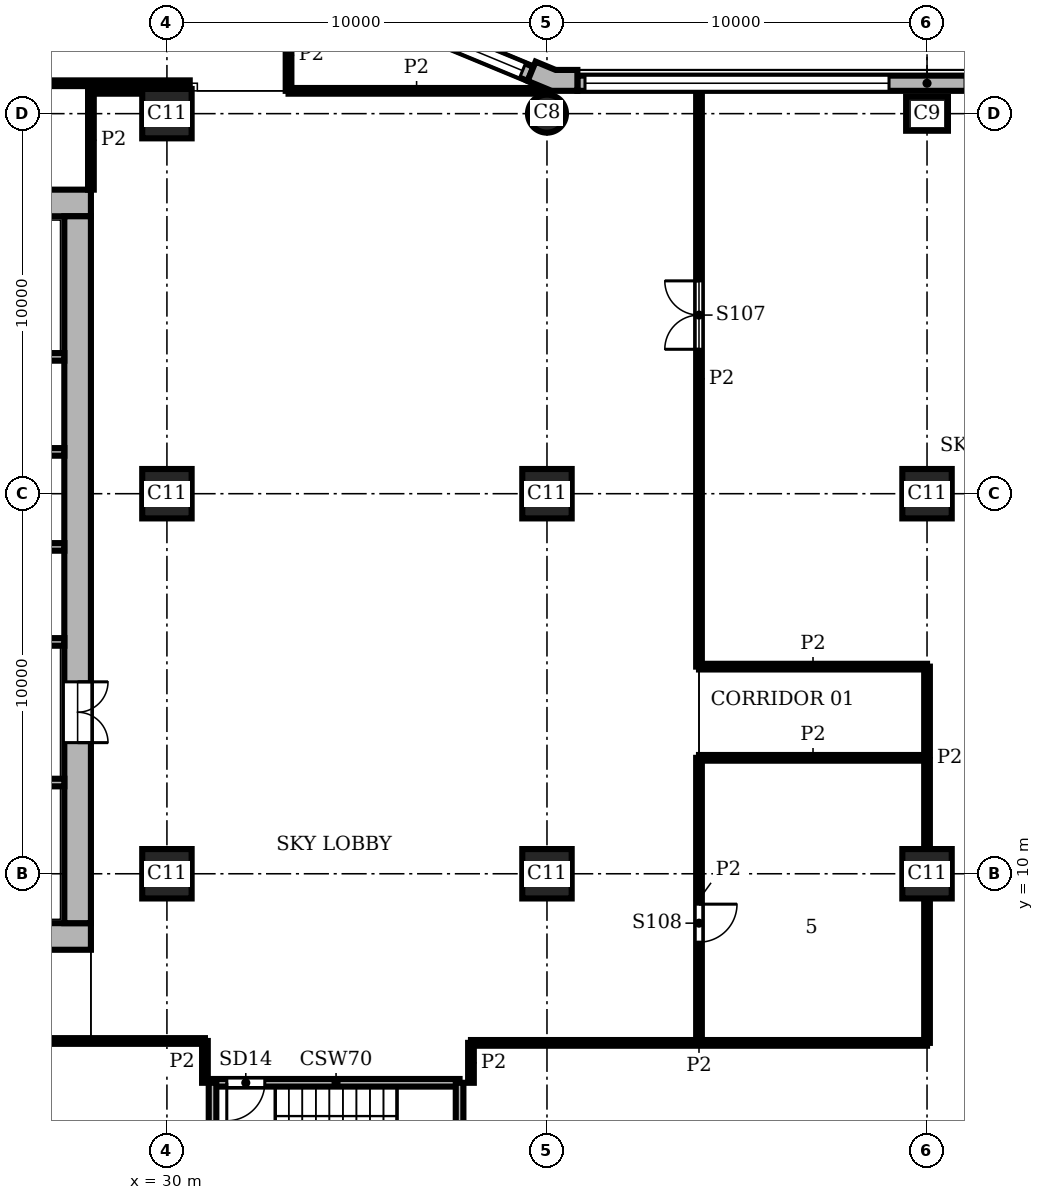
"""IFC4 building model, lengths in metres.
Left out: names, types, materials, properties, quantities, classifications, styles, units other than length and angle.
Written with IfcOpenShell. Run it as: python <this file> out.ifc"""

import sys

from ifc_helpers import new_model, si_unit, direction, frame, frame_2d, origin, origin_2d, place, context, subcontext, project, spatial, polyline, rectangle, circle, outline, extrude, element, fill, save


model = new_model("IFC4")
c1 = context("Model", 3, precision=1e-05, world=origin(), true_north=direction((0.0, 1.0)))
c2 = subcontext(c1, "Body", "Model", "MODEL_VIEW")
j1 = project(units=[si_unit("LENGTHUNIT", "METRE"), si_unit("PLANEANGLEUNIT", "RADIAN")], contexts=[c1])
p1 = place(None, origin())
s1 = spatial("IfcSite", under=j1, at=p1, CompositionType="ELEMENT")
p2 = place(p1, origin())
s2 = spatial("IfcBuilding", under=s1, at=p2, CompositionType="ELEMENT")
p3 = place(p2, frame((0.0, 0.0, 126.3)))
s3 = spatial("IfcBuildingStorey", under=s2, at=p3, CompositionType="ELEMENT", Elevation=126.3)
p4 = place(p3, frame((50.0, 30.0, 0.0), z_axis=(0.0, 0.0, 1.0), x_axis=(1.0, 0.0, 0.0)))
e1 = element("IfcColumn", 1, at=p4, inside=s3, PredefinedType="COLUMN", context=c2, shape_type="SweptSolid", body=[
    extrude(rectangle(XDim=1.1, YDim=0.9, at=origin_2d()), origin(), (0.0, 0.0, 1.0), 5.4),
])
p5 = place(p3, frame((40.0, 30.0, 0.0), z_axis=(0.0, 0.0, 1.0), x_axis=(1.0, 0.0, 0.0)))
e2 = element("IfcColumn", 2, at=p5, inside=s3, PredefinedType="COLUMN", context=c2, shape_type="SweptSolid", body=[
    extrude(circle(Radius=0.5, at=origin_2d()), origin(), (0.0, 0.0, 1.0), 5.4),
])
for number, where, z_axis, x_axis in (
    (3, (30.0, 10.0, 0.0), (0.0, 0.0, 1.0), (1.0, 0.0, 0.0)),
    (4, (30.0, 20.0, 0.0), (0.0, 0.0, 1.0), (1.0, 0.0, 0.0)),
    (5, (30.0, 30.0, 0.0), (0.0, 0.0, 1.0), (1.0, 0.0, 0.0)),
    (6, (40.0, 10.0, 0.0), (0.0, 0.0, 1.0), (1.0, 0.0, 0.0)),
    (7, (40.0, 20.0, 0.0), (0.0, 0.0, 1.0), (1.0, 0.0, 0.0)),
    (8, (50.0, 10.0, 0.0), (0.0, 0.0, 1.0), (1.0, 0.0, 0.0)),
    (9, (50.0, 20.0, 0.0), (0.0, 0.0, 1.0), (1.0, 0.0, 0.0)),
):
    element("IfcColumn", number, at=place(p3, frame(where, z_axis=z_axis, x_axis=x_axis)), inside=s3, PredefinedType="COLUMN", context=c2, shape_type="SweptSolid", body=[
        extrude(rectangle(XDim=1.3, YDim=1.3, at=origin_2d()), origin(), (0.0, 0.0, 1.0), 5.4),
    ])
p6 = place(p3, frame((8.0, 8.35, 0.0), z_axis=(0.0, 0.0, 1.0), x_axis=(1.0, 0.0, 0.0)))
e10 = element("IfcWall", 10, at=p6, inside=s3, PredefinedType="SHEAR", context=c2, shape_type="SweptSolid", body=[
    extrude(rectangle(XDim=20.0, YDim=0.7, at=frame_2d((10.0, 0.0))), origin(), (0.0, 0.0, 1.0), 5.4),
])
p7 = place(p3, frame((27.65, 8.7, 0.0), z_axis=(0.0, 0.0, 1.0), x_axis=(0.0, 1.0, 0.0)))
e11 = element("IfcWall", 11, at=p7, inside=s3, PredefinedType="SHEAR", context=c2, shape_type="SweptSolid", body=[
    extrude(rectangle(XDim=18.6, YDim=0.7, at=frame_2d((9.3, 0.0))), origin(), (0.0, 0.0, 1.0), 5.4),
])
p8 = place(p7, frame((4.75, 0.0, 0.0)))
e12 = element("IfcOpeningElement", 12, at=p8, cuts=e11, PredefinedType="OPENING", context=c2, shape_type="SweptSolid", body=[
    extrude(rectangle(XDim=1.6, YDim=2.1, at=frame_2d((0.8, 1.05))), frame((0.0, 0.36, 0.0), z_axis=(0.0, -1.0, 0.0), x_axis=(1.0, 0.0, 0.0)), (0.0, 0.0, 1.0), 0.72),
])
p9 = place(p3, frame((28.0, 27.65, 0.0), z_axis=(0.0, 0.0, 1.0), x_axis=(-1.0, 0.0, 0.0)))
e13 = element("IfcWall", 13, at=p9, inside=s3, PredefinedType="SHEAR", context=c2, shape_type="SweptSolid", body=[
    extrude(rectangle(XDim=20.0, YDim=0.7, at=frame_2d((10.0, 0.0))), origin(), (0.0, 0.0, 1.0), 5.4),
])
p10 = place(p3, origin())
e14 = element("IfcWall", 14, at=p10, inside=s3, PredefinedType="SOLIDWALL", context=c2, shape_type="SweptSolid", body=[
    extrude(outline(polyline([(40.8, 31.0), (40.8, 31.15), (40.229, 31.15), (39.701, 31.369), (39.644, 31.23), (39.49, 30.861), (40.119, 30.6), (40.8, 30.6), (40.8, 31.0)])), origin(), (0.0, 0.0, 1.0), 5.4),
])
p11 = place(p3, frame((59.2, 30.8, 0.0), z_axis=(0.0, 0.0, 1.0), x_axis=(-1.0, 0.0, 0.0)))
e15 = element("IfcWall", 15, at=p11, inside=s3, PredefinedType="SOLIDWALL", context=c2, shape_type="SweptSolid", body=[
    extrude(rectangle(XDim=18.4, YDim=0.4, at=frame_2d((9.2, 0.0))), origin(), (0.0, 0.0, 1.0), 5.4),
])
p12 = place(p11, frame((0.2, 0.0, 0.9)))
e16 = element("IfcOpeningElement", 16, at=p12, cuts=e15, PredefinedType="OPENING", context=c2, shape_type="SweptSolid", body=[
    extrude(rectangle(XDim=8.0, YDim=3.4, at=frame_2d((4.0, 1.7))), frame((0.0, 0.21, 0.0), z_axis=(0.0, -1.0, 0.0), x_axis=(1.0, 0.0, 0.0)), (0.0, 0.0, 1.0), 0.42),
])
p13 = place(p11, frame((10.2, 0.0, 0.9)))
e17 = element("IfcOpeningElement", 17, at=p13, cuts=e15, PredefinedType="OPENING", context=c2, shape_type="SweptSolid", body=[
    extrude(rectangle(XDim=8.0, YDim=3.4, at=frame_2d((4.0, 1.7))), frame((0.0, 0.21, 0.0), z_axis=(0.0, -1.0, 0.0), x_axis=(1.0, 0.0, 0.0)), (0.0, 0.0, 1.0), 0.42),
])
p14 = place(p3, frame((39.567, 31.045, 0.0), z_axis=(0.0, 0.0, 1.0), x_axis=(-0.923891000409, 0.382655745237, 0.0)))
e18 = element("IfcWall", 18, at=p14, inside=s3, PredefinedType="SOLIDWALL", context=c2, shape_type="SweptSolid", body=[
    extrude(rectangle(XDim=6.053, YDim=0.4, at=frame_2d((3.027, 0.0))), origin(), (0.0, 0.0, 1.0), 5.4),
])
p15 = place(p14, frame((0.227, 0.0, 0.9)))
e19 = element("IfcOpeningElement", 19, at=p15, cuts=e18, PredefinedType="OPENING", context=c2, shape_type="SweptSolid", body=[
    extrude(rectangle(XDim=5.6, YDim=3.4, at=frame_2d((2.8, 1.7))), frame((0.0, 0.21, 0.0), z_axis=(0.0, -1.0, 0.0), x_axis=(1.0, 0.0, 0.0)), (0.0, 0.0, 1.0), 0.42),
])
p16 = place(p3, frame((31.2, 4.5, 0.0), z_axis=(0.0, 0.0, 1.0), x_axis=(1.0, 0.0, 0.0)))
e20 = element("IfcWall", 20, at=p16, inside=s3, PredefinedType="SHEAR", context=c2, shape_type="SweptSolid", body=[
    extrude(rectangle(XDim=6.5, YDim=0.2, at=frame_2d((3.25, 0.0))), origin(), (0.0, 0.0, 1.0), 5.08),
])
p17 = place(p16, frame((0.375, 0.0, 0.0)))
e21 = element("IfcOpeningElement", 21, at=p17, cuts=e20, PredefinedType="OPENING", context=c2, shape_type="SweptSolid", body=[
    extrude(rectangle(XDim=1.0, YDim=2.1, at=frame_2d((0.5, 1.05))), frame((0.0, 0.11, 0.0), z_axis=(0.0, -1.0, 0.0), x_axis=(1.0, 0.0, 0.0)), (0.0, 0.0, 1.0), 0.22),
])
p18 = place(p3, frame((13.8, 12.4, 0.0), z_axis=(0.0, 0.0, 1.0), x_axis=(1.0, 0.0, 0.0)))
e22 = element("IfcWall", 22, at=p18, inside=s3, PredefinedType="SHEAR", context=c2, shape_type="SweptSolid", body=[
    extrude(rectangle(XDim=13.5, YDim=0.2, at=frame_2d((6.75, 0.0))), origin(), (0.0, 0.0, 1.0), 5.08),
])
p19 = place(p18, frame((2.4, 0.0, 0.0)))
e23 = element("IfcOpeningElement", 23, at=p19, cuts=e22, PredefinedType="OPENING", context=c2, shape_type="SweptSolid", body=[
    extrude(rectangle(XDim=1.1, YDim=2.1, at=frame_2d((0.55, 1.05))), frame((0.0, 0.11, 0.0), z_axis=(0.0, -1.0, 0.0), x_axis=(1.0, 0.0, 0.0)), (0.0, 0.0, 1.0), 0.22),
])
p20 = place(p18, frame((4.9, 0.0, 0.0)))
e24 = element("IfcOpeningElement", 24, at=p20, cuts=e22, PredefinedType="OPENING", context=c2, shape_type="SweptSolid", body=[
    extrude(rectangle(XDim=1.1, YDim=2.1, at=frame_2d((0.55, 1.05))), frame((0.0, 0.11, 0.0), z_axis=(0.0, -1.0, 0.0), x_axis=(1.0, 0.0, 0.0)), (0.0, 0.0, 1.0), 0.22),
])
p21 = place(p18, frame((0.2, 0.0, 0.0)))
e25 = element("IfcOpeningElement", 25, at=p21, cuts=e22, PredefinedType="OPENING", context=c2, shape_type="SweptSolid", body=[
    extrude(rectangle(XDim=1.0, YDim=2.1, at=frame_2d((0.5, 1.05))), frame((0.0, 0.11, 0.0), z_axis=(0.0, -1.0, 0.0), x_axis=(1.0, 0.0, 0.0)), (0.0, 0.0, 1.0), 0.22),
])
for number, where, z_axis, x_axis in (
    (26, (24.3, 16.1, 0.0), (0.0, 0.0, 1.0), (1.0, 0.0, 0.0)),
    (27, (24.3, 18.6, 0.0), (0.0, 0.0, 1.0), (1.0, 0.0, 0.0)),
    (28, (24.3, 21.1, 0.0), (0.0, 0.0, 1.0), (1.0, 0.0, 0.0)),
):
    element("IfcWall", number, at=place(p3, frame(where, z_axis=z_axis, x_axis=x_axis)), inside=s3, PredefinedType="SHEAR", context=c2, shape_type="SweptSolid", body=[
        extrude(rectangle(XDim=3.0, YDim=0.2, at=frame_2d((1.5, 0.0))), origin(), (0.0, 0.0, 1.0), 5.08),
    ])
p22 = place(p3, frame((13.8, 23.6, 0.0), z_axis=(0.0, 0.0, 1.0), x_axis=(1.0, 0.0, 0.0)))
e29 = element("IfcWall", 29, at=p22, inside=s3, PredefinedType="SHEAR", context=c2, shape_type="SweptSolid", body=[
    extrude(rectangle(XDim=13.5, YDim=0.2, at=frame_2d((6.75, 0.0))), origin(), (0.0, 0.0, 1.0), 5.08),
])
p23 = place(p22, frame((2.4, 0.0, 0.0)))
e30 = element("IfcOpeningElement", 30, at=p23, cuts=e29, PredefinedType="OPENING", context=c2, shape_type="SweptSolid", body=[
    extrude(rectangle(XDim=1.1, YDim=2.1, at=frame_2d((0.55, 1.05))), frame((0.0, 0.11, 0.0), z_axis=(0.0, -1.0, 0.0), x_axis=(1.0, 0.0, 0.0)), (0.0, 0.0, 1.0), 0.22),
])
p24 = place(p22, frame((4.9, 0.0, 0.0)))
e31 = element("IfcOpeningElement", 31, at=p24, cuts=e29, PredefinedType="OPENING", context=c2, shape_type="SweptSolid", body=[
    extrude(rectangle(XDim=1.1, YDim=2.1, at=frame_2d((0.55, 1.05))), frame((0.0, 0.11, 0.0), z_axis=(0.0, -1.0, 0.0), x_axis=(1.0, 0.0, 0.0)), (0.0, 0.0, 1.0), 0.22),
])
p25 = place(p22, frame((0.2, 0.0, 0.0)))
e32 = element("IfcOpeningElement", 32, at=p25, cuts=e29, PredefinedType="OPENING", context=c2, shape_type="SweptSolid", body=[
    extrude(rectangle(XDim=1.0, YDim=2.1, at=frame_2d((0.5, 1.05))), frame((0.0, 0.11, 0.0), z_axis=(0.0, -1.0, 0.0), x_axis=(1.0, 0.0, 0.0)), (0.0, 0.0, 1.0), 0.22),
])
for number, where, z_axis, x_axis in (
    (33, (31.2, 1.2, 0.0), (0.0, 0.0, 1.0), (0.0, 1.0, 0.0)),
    (34, (37.7, 1.2, 0.0), (0.0, 0.0, 1.0), (0.0, 1.0, 0.0)),
):
    element("IfcWall", number, at=place(p3, frame(where, z_axis=z_axis, x_axis=x_axis)), inside=s3, PredefinedType="SHEAR", context=c2, shape_type="SweptSolid", body=[
        extrude(rectangle(XDim=3.3, YDim=0.2, at=frame_2d((1.65, 0.0))), origin(), (0.0, 0.0, 1.0), 5.08),
    ])
p26 = place(p3, frame((28.0, 28.0, 0.0), z_axis=(0.0, 0.0, 1.0), x_axis=(0.0, 1.0, 0.0)))
e35 = element("IfcWall", 35, at=p26, inside=s3, PredefinedType="PARTITIONING", context=c2, shape_type="SweptSolid", body=[
    extrude(rectangle(XDim=2.598, YDim=0.15, at=frame_2d((1.299, 0.0))), origin(), (0.0, 0.0, 1.0), 5.08),
])
p27 = place(p3, frame((31.0, 4.5, 0.0), z_axis=(0.0, 0.0, 1.0), x_axis=(0.0, 1.0, 0.0)))
e36 = element("IfcWall", 36, at=p27, inside=s3, PredefinedType="PARTITIONING", context=c2, shape_type="SweptSolid", body=[
    extrude(rectangle(XDim=1.1, YDim=0.15, at=frame_2d((0.55, 0.0))), origin(), (0.0, 0.0, 1.0), 5.08),
])
p28 = place(p3, frame((33.2, 30.6, 0.0), z_axis=(0.0, 0.0, 1.0), x_axis=(0.0, 1.0, 0.0)))
e37 = element("IfcWall", 37, at=p28, inside=s3, PredefinedType="PARTITIONING", context=c2, shape_type="SweptSolid", body=[
    extrude(rectangle(XDim=1.869, YDim=0.15, at=frame_2d((0.935, 0.0))), origin(), (0.0, 0.0, 1.0), 5.08),
])
p29 = place(p3, frame((38.0, 4.5, 0.0), z_axis=(0.0, 0.0, 1.0), x_axis=(0.0, 1.0, 0.0)))
e38 = element("IfcWall", 38, at=p29, inside=s3, PredefinedType="PARTITIONING", context=c2, shape_type="SweptSolid", body=[
    extrude(rectangle(XDim=1.05, YDim=0.15, at=frame_2d((0.525, 0.0))), origin(), (0.0, 0.0, 1.0), 5.08),
])
p30 = place(p3, frame((44.0, 5.6, 0.0), z_axis=(0.0, 0.0, 1.0), x_axis=(0.0, 1.0, 0.0)))
e39 = element("IfcWall", 39, at=p30, inside=s3, PredefinedType="PARTITIONING", context=c2, shape_type="SweptSolid", body=[
    extrude(rectangle(XDim=7.45, YDim=0.15, at=frame_2d((3.725, 0.0))), origin(), (0.0, 0.0, 1.0), 5.08),
])
p31 = place(p30, frame((2.6, 0.0, 0.0)))
e40 = element("IfcOpeningElement", 40, at=p31, cuts=e39, PredefinedType="OPENING", context=c2, shape_type="SweptSolid", body=[
    extrude(rectangle(XDim=1.0, YDim=2.1, at=frame_2d((0.5, 1.05))), frame((0.0, 0.085, 0.0), z_axis=(0.0, -1.0, 0.0), x_axis=(1.0, 0.0, 0.0)), (0.0, 0.0, 1.0), 0.17),
])
p32 = place(p3, frame((44.0, 15.45, 0.0), z_axis=(0.0, 0.0, 1.0), x_axis=(0.0, 1.0, 0.0)))
e41 = element("IfcWall", 41, at=p32, inside=s3, PredefinedType="PARTITIONING", context=c2, shape_type="SweptSolid", body=[
    extrude(rectangle(XDim=15.15, YDim=0.15, at=frame_2d((7.575, 0.0))), origin(), (0.0, 0.0, 1.0), 5.08),
])
p33 = place(p32, frame((8.35, 0.0, 0.0)))
e42 = element("IfcOpeningElement", 42, at=p33, cuts=e41, PredefinedType="OPENING", context=c2, shape_type="SweptSolid", body=[
    extrude(rectangle(XDim=1.8, YDim=2.1, at=frame_2d((0.9, 1.05))), frame((0.0, 0.085, 0.0), z_axis=(0.0, -1.0, 0.0), x_axis=(1.0, 0.0, 0.0)), (0.0, 0.0, 1.0), 0.17),
])
p34 = place(p3, frame((50.0, 5.55, 0.0), z_axis=(0.0, 0.0, 1.0), x_axis=(0.0, 1.0, 0.0)))
e43 = element("IfcWall", 43, at=p34, inside=s3, PredefinedType="PARTITIONING", context=c2, shape_type="SweptSolid", body=[
    extrude(rectangle(XDim=3.8, YDim=0.15, at=frame_2d((1.9, 0.0))), origin(), (0.0, 0.0, 1.0), 5.08),
])
p35 = place(p3, frame((50.0, 10.65, 0.0), z_axis=(0.0, 0.0, 1.0), x_axis=(0.0, 1.0, 0.0)))
e44 = element("IfcWall", 44, at=p35, inside=s3, PredefinedType="PARTITIONING", context=c2, shape_type="SweptSolid", body=[
    extrude(rectangle(XDim=4.8, YDim=0.15, at=frame_2d((2.4, 0.0))), origin(), (0.0, 0.0, 1.0), 5.08),
])
p36 = place(p3, frame((38.0, 5.55, 0.0), z_axis=(0.0, 0.0, 1.0), x_axis=(1.0, 0.0, 0.0)))
e45 = element("IfcWall", 45, at=p36, inside=s3, PredefinedType="PARTITIONING", context=c2, shape_type="SweptSolid", body=[
    extrude(rectangle(XDim=12.0, YDim=0.15, at=frame_2d((6.0, 0.0))), origin(), (0.0, 0.0, 1.0), 5.08),
])
p37 = place(p3, frame((5.6, 5.6, 0.0), z_axis=(0.0, 0.0, 1.0), x_axis=(1.0, 0.0, 0.0)))
e46 = element("IfcWall", 46, at=p37, inside=s3, PredefinedType="PARTITIONING", context=c2, shape_type="SweptSolid", body=[
    extrude(rectangle(XDim=25.4, YDim=0.15, at=frame_2d((12.7, 0.0))), origin(), (0.0, 0.0, 1.0), 5.08),
])
p38 = place(p37, frame((4.1, 0.0, 0.0)))
e47 = element("IfcOpeningElement", 47, at=p38, cuts=e46, PredefinedType="OPENING", context=c2, shape_type="SweptSolid", body=[
    extrude(rectangle(XDim=0.8, YDim=2.1, at=frame_2d((0.4, 1.05))), frame((0.0, 0.085, 0.0), z_axis=(0.0, -1.0, 0.0), x_axis=(1.0, 0.0, 0.0)), (0.0, 0.0, 1.0), 0.17),
])
p39 = place(p37, frame((11.5, 0.0, 0.0)))
e48 = element("IfcOpeningElement", 48, at=p39, cuts=e46, PredefinedType="OPENING", context=c2, shape_type="SweptSolid", body=[
    extrude(rectangle(XDim=1.0, YDim=2.1, at=frame_2d((0.5, 1.05))), frame((0.0, 0.085, 0.0), z_axis=(0.0, -1.0, 0.0), x_axis=(1.0, 0.0, 0.0)), (0.0, 0.0, 1.0), 0.17),
])
for number, where, z_axis, x_axis in (
    (49, (44.0, 13.05, 0.0), (0.0, 0.0, 1.0), (1.0, 0.0, 0.0)),
    (50, (44.0, 15.45, 0.0), (0.0, 0.0, 1.0), (1.0, 0.0, 0.0)),
):
    element("IfcWall", number, at=place(p3, frame(where, z_axis=z_axis, x_axis=x_axis)), inside=s3, PredefinedType="PARTITIONING", context=c2, shape_type="SweptSolid", body=[
        extrude(rectangle(XDim=6.0, YDim=0.15, at=frame_2d((3.0, 0.0))), origin(), (0.0, 0.0, 1.0), 5.08),
    ])
p40 = place(p3, frame((28.002, 30.6, 0.0), z_axis=(0.0, 0.0, 1.0), x_axis=(1.0, 0.0, 0.0)))
e51 = element("IfcWall", 51, at=p40, inside=s3, PredefinedType="PARTITIONING", context=c2, shape_type="SweptSolid", body=[
    extrude(rectangle(XDim=1.348, YDim=0.15, at=frame_2d((0.674, 0.0))), origin(), (0.0, 0.0, 1.0), 5.08),
])
p41 = place(p3, frame((33.2, 30.6, 0.0), z_axis=(0.0, 0.0, 1.0), x_axis=(1.0, 0.0, 0.0)))
e52 = element("IfcWall", 52, at=p41, inside=s3, PredefinedType="PARTITIONING", context=c2, shape_type="SweptSolid", body=[
    extrude(rectangle(XDim=6.738, YDim=0.15, at=frame_2d((3.369, 0.0))), origin(), (0.0, 0.0, 1.0), 5.08),
])
p42 = place(p3, frame((13.802, 30.8, 0.0), z_axis=(0.0, 0.0, 1.0), x_axis=(1.0, 0.0, 0.0)))
e53 = element("IfcWall", 53, at=p42, inside=s3, PredefinedType="PARTITIONING", context=c2, shape_type="SweptSolid", body=[
    extrude(rectangle(XDim=16.798, YDim=0.15, at=frame_2d((8.399, 0.0))), origin(), (0.0, 0.0, 1.0), 5.08),
])
p43 = place(p42, frame((8.35, 0.0, 0.0)))
e54 = element("IfcOpeningElement", 54, at=p43, cuts=e53, PredefinedType="OPENING", context=c2, shape_type="SweptSolid", body=[
    extrude(rectangle(XDim=1.0, YDim=2.1, at=frame_2d((0.5, 1.05))), frame((0.0, 0.085, 0.0), z_axis=(0.0, -1.0, 0.0), x_axis=(1.0, 0.0, 0.0)), (0.0, 0.0, 1.0), 0.17),
])
p44 = place(p13, origin())
e55 = element("IfcWindow", 55, at=p44, inside=s3, PartitioningType="SINGLE_PANEL", PredefinedType="WINDOW", context=c2, shape_type="SweptSolid", body=[
    extrude(rectangle(XDim=8.0, YDim=3.4, at=frame_2d((4.0, 1.7))), frame((0.0, 0.16, 0.0), z_axis=(0.0, -1.0, 0.0), x_axis=(1.0, 0.0, 0.0)), (0.0, 0.0, 1.0), 0.06),
])
fill(e17, e55)
p45 = place(p15, origin())
e56 = element("IfcWindow", 56, at=p45, inside=s3, PartitioningType="SINGLE_PANEL", PredefinedType="WINDOW", context=c2, shape_type="SweptSolid", body=[
    extrude(rectangle(XDim=5.6, YDim=3.4, at=frame_2d((2.8, 1.7))), frame((0.0, 0.16, 0.0), z_axis=(0.0, -1.0, 0.0), x_axis=(1.0, 0.0, 0.0)), (0.0, 0.0, 1.0), 0.06),
])
fill(e19, e56)
p46 = place(p17, frame((1.0, 0.0, 0.0), z_axis=(0.0, 0.0, 1.0), x_axis=(-1.0, 0.0, 0.0)))
e57 = element("IfcDoor", 57, at=p46, inside=s3, OperationType="SINGLE_SWING_RIGHT", PredefinedType="DOOR", context=c2, shape_type="SweptSolid", body=[
    extrude(rectangle(XDim=1.0, YDim=2.1, at=frame_2d((0.5, 1.05))), frame((0.0, 0.025, 0.0), z_axis=(0.0, -1.0, 0.0), x_axis=(1.0, 0.0, 0.0)), (0.0, 0.0, 1.0), 0.05),
])
fill(e21, e57)
p47 = place(p8, frame((1.6, 0.0, 0.0), z_axis=(0.0, 0.0, 1.0), x_axis=(-1.0, 0.0, 0.0)))
e58 = element("IfcDoor", 58, at=p47, inside=s3, OperationType="DOUBLE_DOOR_SINGLE_SWING", PredefinedType="DOOR", context=c2, shape_type="SweptSolid", body=[
    extrude(rectangle(XDim=1.6, YDim=2.1, at=frame_2d((0.8, 1.05))), frame((0.0, 0.025, 0.0), z_axis=(0.0, -1.0, 0.0), x_axis=(1.0, 0.0, 0.0)), (0.0, 0.0, 1.0), 0.05),
])
fill(e12, e58)
p48 = place(p33, origin())
e59 = element("IfcDoor", 59, at=p48, inside=s3, OperationType="DOUBLE_DOOR_SINGLE_SWING", PredefinedType="DOOR", context=c2, shape_type="SweptSolid", body=[
    extrude(rectangle(XDim=1.8, YDim=2.1, at=frame_2d((0.9, 1.05))), frame((0.0, 0.025, 0.0), z_axis=(0.0, -1.0, 0.0), x_axis=(1.0, 0.0, 0.0)), (0.0, 0.0, 1.0), 0.05),
])
fill(e42, e59)
p49 = place(p31, frame((1.0, 0.0, 0.0), z_axis=(0.0, 0.0, 1.0), x_axis=(-1.0, 0.0, 0.0)))
e60 = element("IfcDoor", 60, at=p49, inside=s3, OperationType="SINGLE_SWING_LEFT", PredefinedType="DOOR", context=c2, shape_type="SweptSolid", body=[
    extrude(rectangle(XDim=1.0, YDim=2.1, at=frame_2d((0.5, 1.05))), frame((0.0, 0.025, 0.0), z_axis=(0.0, -1.0, 0.0), x_axis=(1.0, 0.0, 0.0)), (0.0, 0.0, 1.0), 0.05),
])
fill(e40, e60)
save(model, sys.argv[1])
